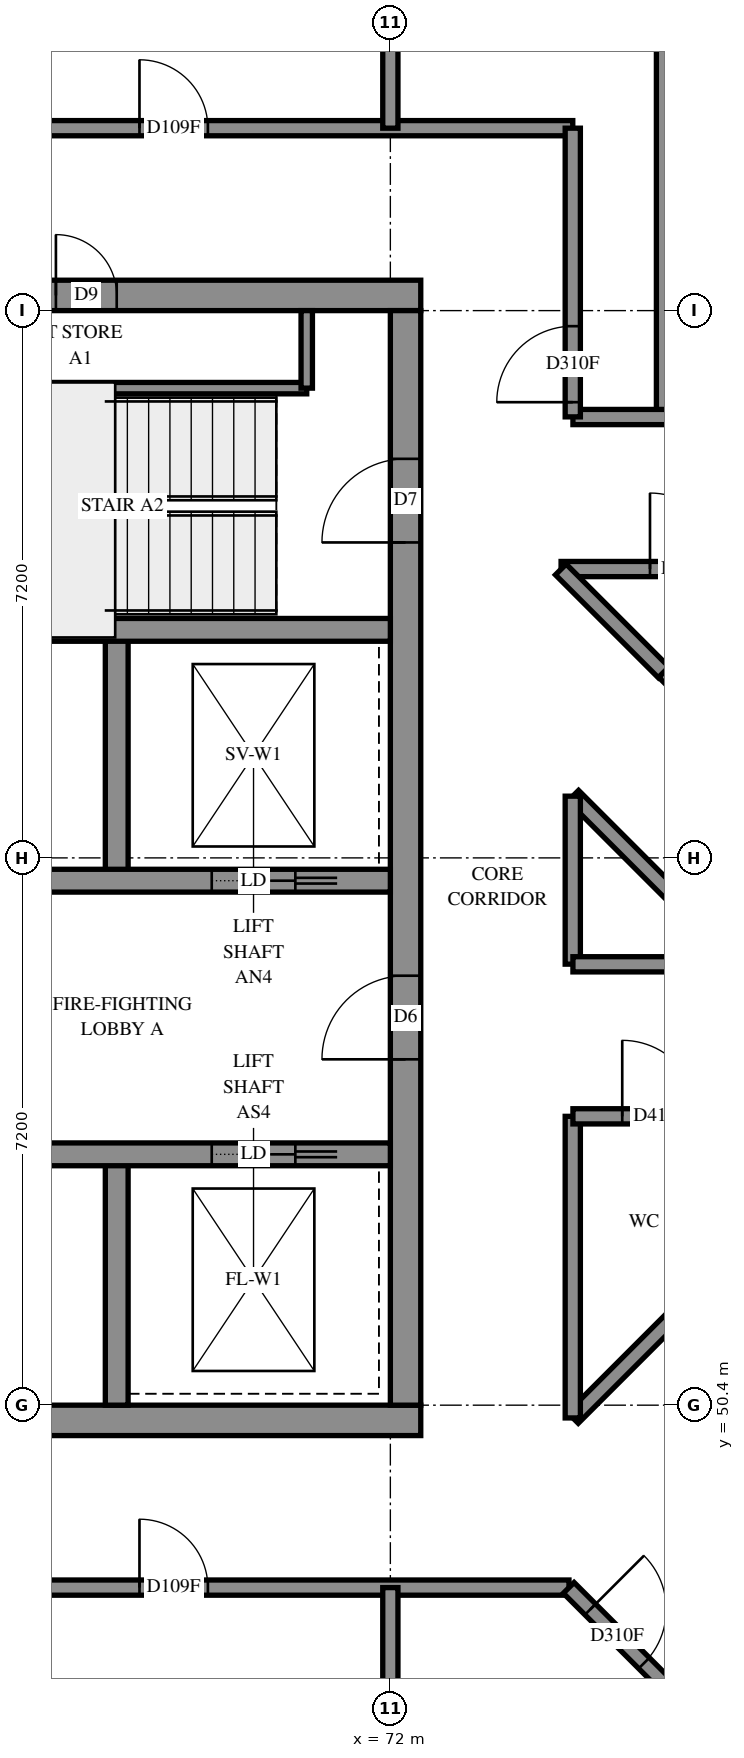
"""IFC4 building model, lengths in metres.
Left out: names, types, materials, properties, quantities, classifications, styles, units other than length and angle.
Written with IfcOpenShell. Run it as: python <this file> out.ifc"""

import sys

from ifc_helpers import new_model, si_unit, direction, frame, frame_2d, origin, place, context, subcontext, project, spatial, rectangle, extrude, element, fill, save


model = new_model("IFC4")
c1 = context("Model", 3, precision=1e-05, world=origin(), true_north=direction((0.0, 1.0)))
c2 = subcontext(c1, "Body", "Model", "MODEL_VIEW")
j1 = project(units=[si_unit("LENGTHUNIT", "METRE"), si_unit("PLANEANGLEUNIT", "RADIAN")], contexts=[c1])
p1 = place(None, origin())
s1 = spatial("IfcSite", under=j1, at=p1, CompositionType="ELEMENT")
p2 = place(p1, origin())
s2 = spatial("IfcBuilding", under=s1, at=p2, CompositionType="ELEMENT")
p3 = place(p2, frame((0.0, 0.0, 243.8)))
s3 = spatial("IfcBuildingStorey", under=s2, at=p3, CompositionType="ELEMENT", Elevation=243.8)
p4 = place(p3, frame((57.2, 50.2, -0.3), z_axis=(0.0, 0.0, 1.0), x_axis=(1.0, 0.0, 0.0)))
e1 = element("IfcWall", 1, at=p4, inside=s3, PredefinedType="SHEAR", context=c2, shape_type="SweptSolid", body=[
    extrude(rectangle(XDim=15.2, YDim=0.4, at=frame_2d((7.6, 0.0))), origin(), (0.0, 0.0, 1.0), 2.7),
])
p5 = place(p3, frame((57.2, 65.0, -0.3), z_axis=(0.0, 0.0, 1.0), x_axis=(1.0, 0.0, 0.0)))
e2 = element("IfcWall", 2, at=p5, inside=s3, PredefinedType="SHEAR", context=c2, shape_type="SweptSolid", body=[
    extrude(rectangle(XDim=15.2, YDim=0.4, at=frame_2d((7.6, 0.0))), origin(), (0.0, 0.0, 1.0), 2.7),
])
p6 = place(p5, frame((10.4, 0.0, 0.3)))
e3 = element("IfcOpeningElement", 3, at=p6, cuts=e2, PredefinedType="OPENING", context=c2, shape_type="SweptSolid", body=[
    extrude(rectangle(XDim=0.8, YDim=2.1, at=frame_2d((0.4, 1.05))), frame((0.0, 0.21, 0.0), z_axis=(0.0, -1.0, 0.0), x_axis=(1.0, 0.0, 0.0)), (0.0, 0.0, 1.0), 0.42),
])
p7 = place(p3, frame((72.2, 50.4, -0.3), z_axis=(0.0, 0.0, 1.0), x_axis=(0.0, 1.0, 0.0)))
e4 = element("IfcWall", 4, at=p7, inside=s3, PredefinedType="SHEAR", context=c2, shape_type="SweptSolid", body=[
    extrude(rectangle(XDim=14.4, YDim=0.4, at=frame_2d((7.2, 0.0))), origin(), (0.0, 0.0, 1.0), 2.7),
])
p8 = place(p7, frame((4.55, 0.0, 0.3)))
e5 = element("IfcOpeningElement", 5, at=p8, cuts=e4, PredefinedType="OPENING", context=c2, shape_type="SweptSolid", body=[
    extrude(rectangle(XDim=1.1, YDim=2.1, at=frame_2d((0.55, 1.05))), frame((0.0, 0.21, 0.0), z_axis=(0.0, -1.0, 0.0), x_axis=(1.0, 0.0, 0.0)), (0.0, 0.0, 1.0), 0.42),
])
p9 = place(p7, frame((11.35, 0.0, 0.3)))
e6 = element("IfcOpeningElement", 6, at=p9, cuts=e4, PredefinedType="OPENING", context=c2, shape_type="SweptSolid", body=[
    extrude(rectangle(XDim=1.1, YDim=2.1, at=frame_2d((0.55, 1.05))), frame((0.0, 0.21, 0.0), z_axis=(0.0, -1.0, 0.0), x_axis=(1.0, 0.0, 0.0)), (0.0, 0.0, 1.0), 0.42),
])
for number, where, z_axis, x_axis in (
    (7, (68.4, 50.4, 0.0), (0.0, 0.0, 1.0), (0.0, 1.0, 0.0)),
    (8, (68.4, 57.3, 0.0), (0.0, 0.0, 1.0), (0.0, 1.0, 0.0)),
):
    element("IfcWall", number, at=place(p3, frame(where, z_axis=z_axis, x_axis=x_axis)), inside=s3, PredefinedType="SOLIDWALL", context=c2, shape_type="SweptSolid", body=[
        extrude(rectangle(XDim=3.3, YDim=0.3, at=frame_2d((1.65, 0.0))), origin(), (0.0, 0.0, 1.0), 3.1),
    ])
p10 = place(p3, frame((57.6, 53.7, 0.0), z_axis=(0.0, 0.0, 1.0), x_axis=(1.0, 0.0, 0.0)))
e9 = element("IfcWall", 9, at=p10, inside=s3, PredefinedType="SOLIDWALL", context=c2, shape_type="SweptSolid", body=[
    extrude(rectangle(XDim=14.4, YDim=0.3, at=frame_2d((7.2, 0.0))), origin(), (0.0, 0.0, 1.0), 3.1),
])
p11 = place(p10, frame((1.35, 0.0, 0.0)))
e10 = element("IfcOpeningElement", 10, at=p11, cuts=e9, PredefinedType="OPENING", context=c2, shape_type="SweptSolid", body=[
    extrude(rectangle(XDim=0.9, YDim=2.1, at=frame_2d((0.45, 1.05))), frame((0.0, 0.16, 0.0), z_axis=(0.0, -1.0, 0.0), x_axis=(1.0, 0.0, 0.0)), (0.0, 0.0, 1.0), 0.32),
])
p12 = place(p10, frame((4.95, 0.0, 0.0)))
e11 = element("IfcOpeningElement", 11, at=p12, cuts=e9, PredefinedType="OPENING", context=c2, shape_type="SweptSolid", body=[
    extrude(rectangle(XDim=0.9, YDim=2.1, at=frame_2d((0.45, 1.05))), frame((0.0, 0.16, 0.0), z_axis=(0.0, -1.0, 0.0), x_axis=(1.0, 0.0, 0.0)), (0.0, 0.0, 1.0), 0.32),
])
p13 = place(p10, frame((8.55, 0.0, 0.0)))
e12 = element("IfcOpeningElement", 12, at=p13, cuts=e9, PredefinedType="OPENING", context=c2, shape_type="SweptSolid", body=[
    extrude(rectangle(XDim=0.9, YDim=2.1, at=frame_2d((0.45, 1.05))), frame((0.0, 0.16, 0.0), z_axis=(0.0, -1.0, 0.0), x_axis=(1.0, 0.0, 0.0)), (0.0, 0.0, 1.0), 0.32),
])
p14 = place(p10, frame((12.05, 0.0, 0.0)))
e13 = element("IfcOpeningElement", 13, at=p14, cuts=e9, PredefinedType="OPENING", context=c2, shape_type="SweptSolid", body=[
    extrude(rectangle(XDim=1.1, YDim=2.1, at=frame_2d((0.55, 1.05))), frame((0.0, 0.16, 0.0), z_axis=(0.0, -1.0, 0.0), x_axis=(1.0, 0.0, 0.0)), (0.0, 0.0, 1.0), 0.32),
])
p15 = place(p3, frame((57.6, 57.3, 0.0), z_axis=(0.0, 0.0, 1.0), x_axis=(1.0, 0.0, 0.0)))
e14 = element("IfcWall", 14, at=p15, inside=s3, PredefinedType="SOLIDWALL", context=c2, shape_type="SweptSolid", body=[
    extrude(rectangle(XDim=14.4, YDim=0.3, at=frame_2d((7.2, 0.0))), origin(), (0.0, 0.0, 1.0), 3.1),
])
p16 = place(p15, frame((8.55, 0.0, 0.0)))
e15 = element("IfcOpeningElement", 15, at=p16, cuts=e14, PredefinedType="OPENING", context=c2, shape_type="SweptSolid", body=[
    extrude(rectangle(XDim=0.9, YDim=2.1, at=frame_2d((0.45, 1.05))), frame((0.0, 0.16, 0.0), z_axis=(0.0, -1.0, 0.0), x_axis=(1.0, 0.0, 0.0)), (0.0, 0.0, 1.0), 0.32),
])
p17 = place(p15, frame((1.25, 0.0, 0.0)))
e16 = element("IfcOpeningElement", 16, at=p17, cuts=e14, PredefinedType="OPENING", context=c2, shape_type="SweptSolid", body=[
    extrude(rectangle(XDim=1.1, YDim=2.1, at=frame_2d((0.55, 1.05))), frame((0.0, 0.16, 0.0), z_axis=(0.0, -1.0, 0.0), x_axis=(1.0, 0.0, 0.0)), (0.0, 0.0, 1.0), 0.32),
])
p18 = place(p15, frame((4.85, 0.0, 0.0)))
e17 = element("IfcOpeningElement", 17, at=p18, cuts=e14, PredefinedType="OPENING", context=c2, shape_type="SweptSolid", body=[
    extrude(rectangle(XDim=1.1, YDim=2.1, at=frame_2d((0.55, 1.05))), frame((0.0, 0.16, 0.0), z_axis=(0.0, -1.0, 0.0), x_axis=(1.0, 0.0, 0.0)), (0.0, 0.0, 1.0), 0.32),
])
p19 = place(p15, frame((12.05, 0.0, 0.0)))
e18 = element("IfcOpeningElement", 18, at=p19, cuts=e14, PredefinedType="OPENING", context=c2, shape_type="SweptSolid", body=[
    extrude(rectangle(XDim=1.1, YDim=2.1, at=frame_2d((0.55, 1.05))), frame((0.0, 0.16, 0.0), z_axis=(0.0, -1.0, 0.0), x_axis=(1.0, 0.0, 0.0)), (0.0, 0.0, 1.0), 0.32),
])
p20 = place(p3, frame((64.8, 60.6, 0.0), z_axis=(0.0, 0.0, 1.0), x_axis=(1.0, 0.0, 0.0)))
e19 = element("IfcWall", 19, at=p20, inside=s3, PredefinedType="SOLIDWALL", context=c2, shape_type="SweptSolid", body=[
    extrude(rectangle(XDim=7.2, YDim=0.3, at=frame_2d((3.6, 0.0))), origin(), (0.0, 0.0, 1.0), 3.1),
])
p21 = place(p3, frame((64.95, 63.78, 0.0), z_axis=(0.0, 0.0, 1.0), x_axis=(1.0, 0.0, 0.0)))
e20 = element("IfcWall", 20, at=p21, inside=s3, PredefinedType="PARTITIONING", context=c2, shape_type="SweptSolid", body=[
    extrude(rectangle(XDim=5.95, YDim=0.15, at=frame_2d((2.975, 0.0))), origin(), (0.0, 0.0, 1.0), 3.1),
])
p22 = place(p3, frame((70.9, 63.78, 0.0), z_axis=(0.0, 0.0, 1.0), x_axis=(0.0, 1.0, 0.0)))
e21 = element("IfcWall", 21, at=p22, inside=s3, PredefinedType="PARTITIONING", context=c2, shape_type="SweptSolid", body=[
    extrude(rectangle(XDim=1.02, YDim=0.15, at=frame_2d((0.51, 0.0))), origin(), (0.0, 0.0, 1.0), 3.1),
])
p23 = place(p3, frame((55.2, 67.2, 0.0), z_axis=(0.0, 0.0, 1.0), x_axis=(1.0, 0.0, 0.0)))
e22 = element("IfcWall", 22, at=p23, inside=s3, PredefinedType="PARTITIONING", context=c2, shape_type="SweptSolid", body=[
    extrude(rectangle(XDim=19.2, YDim=0.2, at=frame_2d((9.6, 0.0))), origin(), (0.0, 0.0, 1.0), 3.1),
])
p24 = place(p23, frame((6.149, 0.0, 0.0)))
e23 = element("IfcOpeningElement", 23, at=p24, cuts=e22, PredefinedType="OPENING", context=c2, shape_type="SweptSolid", body=[
    extrude(rectangle(XDim=0.9, YDim=2.1, at=frame_2d((0.45, 1.05))), frame((0.0, 0.11, 0.0), z_axis=(0.0, -1.0, 0.0), x_axis=(1.0, 0.0, 0.0)), (0.0, 0.0, 1.0), 0.22),
])
p25 = place(p23, frame((13.499, 0.0, 0.0)))
e24 = element("IfcOpeningElement", 24, at=p25, cuts=e22, PredefinedType="OPENING", context=c2, shape_type="SweptSolid", body=[
    extrude(rectangle(XDim=0.9, YDim=2.1, at=frame_2d((0.45, 1.05))), frame((0.0, 0.11, 0.0), z_axis=(0.0, -1.0, 0.0), x_axis=(1.0, 0.0, 0.0)), (0.0, 0.0, 1.0), 0.22),
])
p26 = place(p3, frame((55.2, 48.0, 0.0), z_axis=(0.0, 0.0, 1.0), x_axis=(1.0, 0.0, 0.0)))
e25 = element("IfcWall", 25, at=p26, inside=s3, PredefinedType="PARTITIONING", context=c2, shape_type="SweptSolid", body=[
    extrude(rectangle(XDim=19.15, YDim=0.2, at=frame_2d((9.575, 0.0))), origin(), (0.0, 0.0, 1.0), 3.1),
])
p27 = place(p26, frame((6.299, 0.0, 0.0)))
e26 = element("IfcOpeningElement", 26, at=p27, cuts=e25, PredefinedType="OPENING", context=c2, shape_type="SweptSolid", body=[
    extrude(rectangle(XDim=0.9, YDim=2.1, at=frame_2d((0.45, 1.05))), frame((0.0, 0.11, 0.0), z_axis=(0.0, -1.0, 0.0), x_axis=(1.0, 0.0, 0.0)), (0.0, 0.0, 1.0), 0.22),
])
p28 = place(p26, frame((13.499, 0.0, 0.0)))
e27 = element("IfcOpeningElement", 27, at=p28, cuts=e25, PredefinedType="OPENING", context=c2, shape_type="SweptSolid", body=[
    extrude(rectangle(XDim=0.9, YDim=2.1, at=frame_2d((0.45, 1.05))), frame((0.0, 0.11, 0.0), z_axis=(0.0, -1.0, 0.0), x_axis=(1.0, 0.0, 0.0)), (0.0, 0.0, 1.0), 0.22),
])
p29 = place(p3, frame((75.6, 63.4, 0.0), z_axis=(0.0, 0.0, 1.0), x_axis=(0.0, 1.0, 0.0)))
e28 = element("IfcWall", 28, at=p29, inside=s3, PredefinedType="PARTITIONING", context=c2, shape_type="SweptSolid", body=[
    extrude(rectangle(XDim=9.4, YDim=0.2, at=frame_2d((4.7, 0.0))), origin(), (0.0, 0.0, 1.0), 3.1),
])
p30 = place(p3, frame((74.401, 50.233, 0.0), z_axis=(0.0, 0.0, 1.0), x_axis=(0.7071067812, 0.7071067812, 0.0)))
e29 = element("IfcWall", 29, at=p30, inside=s3, PredefinedType="PARTITIONING", context=c2, shape_type="SweptSolid", body=[
    extrude(rectangle(XDim=5.609, YDim=0.2, at=frame_2d((2.804, 0.0))), origin(), (0.0, 0.0, 1.0), 3.1),
])
p31 = place(p3, frame((74.246, 61.4, 0.0), z_axis=(0.0, 0.0, 1.0), x_axis=(1.0, 0.0, 0.0)))
e30 = element("IfcWall", 30, at=p31, inside=s3, PredefinedType="PARTITIONING", context=c2, shape_type="SweptSolid", body=[
    extrude(rectangle(XDim=4.954, YDim=0.2, at=frame_2d((2.477, 0.0))), origin(), (0.0, 0.0, 1.0), 3.1),
])
p32 = place(p31, frame((1.17, 0.0, 0.0)))
e31 = element("IfcOpeningElement", 31, at=p32, cuts=e30, PredefinedType="OPENING", context=c2, shape_type="SweptSolid", body=[
    extrude(rectangle(XDim=1.0, YDim=2.1, at=frame_2d((0.5, 1.05))), frame((0.0, 0.11, 0.0), z_axis=(0.0, -1.0, 0.0), x_axis=(1.0, 0.0, 0.0)), (0.0, 0.0, 1.0), 0.22),
])
p33 = place(p3, frame((74.402, 63.4, 0.0), z_axis=(0.0, 0.0, 1.0), x_axis=(1.0, 0.0, 0.0)))
e32 = element("IfcWall", 32, at=p33, inside=s3, PredefinedType="PARTITIONING", context=c2, shape_type="SweptSolid", body=[
    extrude(rectangle(XDim=4.798, YDim=0.2, at=frame_2d((2.399, 0.0))), origin(), (0.0, 0.0, 1.0), 3.1),
])
p34 = place(p33, frame((1.723, 0.0, 0.0)))
e33 = element("IfcOpeningElement", 33, at=p34, cuts=e32, PredefinedType="OPENING", context=c2, shape_type="SweptSolid", body=[
    extrude(rectangle(XDim=1.0, YDim=2.1, at=frame_2d((0.5, 1.05))), frame((0.0, 0.11, 0.0), z_axis=(0.0, -1.0, 0.0), x_axis=(1.0, 0.0, 0.0)), (0.0, 0.0, 1.0), 0.22),
])
p35 = place(p3, frame((74.347, 47.997, 0.0), z_axis=(0.0, 0.0, 1.0), x_axis=(0.7071067812, -0.7071067812, 0.0)))
e34 = element("IfcWall", 34, at=p35, inside=s3, PredefinedType="PARTITIONING", context=c2, shape_type="SweptSolid", body=[
    extrude(rectangle(XDim=4.596, YDim=0.2, at=frame_2d((2.298, 0.0))), origin(), (0.0, 0.0, 1.0), 3.1),
])
p36 = place(p35, frame((0.401, 0.0, 0.0)))
e35 = element("IfcOpeningElement", 35, at=p36, cuts=e34, PredefinedType="OPENING", context=c2, shape_type="SweptSolid", body=[
    extrude(rectangle(XDim=1.0, YDim=2.1, at=frame_2d((0.5, 1.05))), frame((0.0, 0.11, 0.0), z_axis=(0.0, -1.0, 0.0), x_axis=(1.0, 0.0, 0.0)), (0.0, 0.0, 1.0), 0.22),
])
for number, where, z_axis, x_axis in (
    (36, (72.0, 43.55, 0.0), (0.0, 0.0, 1.0), (0.0, 1.0, 0.0)),
    (37, (72.0, 67.2, 0.0), (0.0, 0.0, 1.0), (0.0, 1.0, 0.0)),
):
    element("IfcWall", number, at=place(p3, frame(where, z_axis=z_axis, x_axis=x_axis)), inside=s3, PredefinedType="PARTITIONING", context=c2, shape_type="SweptSolid", body=[
        extrude(rectangle(XDim=4.45, YDim=0.2, at=frame_2d((2.225, 0.0))), origin(), (0.0, 0.0, 1.0), 3.1),
    ])
p37 = place(p3, frame((74.4, 50.232, 0.0), z_axis=(0.0, 0.0, 1.0), x_axis=(0.0, 1.0, 0.0)))
e38 = element("IfcWall", 38, at=p37, inside=s3, PredefinedType="PARTITIONING", context=c2, shape_type="SweptSolid", body=[
    extrude(rectangle(XDim=3.968, YDim=0.2, at=frame_2d((1.984, 0.0))), origin(), (0.0, 0.0, 1.0), 3.1),
])
p38 = place(p3, frame((74.402, 54.2, 0.0), z_axis=(0.0, 0.0, 1.0), x_axis=(1.0, 0.0, 0.0)))
e39 = element("IfcWall", 39, at=p38, inside=s3, PredefinedType="PARTITIONING", context=c2, shape_type="SweptSolid", body=[
    extrude(rectangle(XDim=3.966, YDim=0.2, at=frame_2d((1.983, 0.0))), origin(), (0.0, 0.0, 1.0), 3.1),
])
p39 = place(p38, frame((0.649, 0.0, 0.0)))
e40 = element("IfcOpeningElement", 40, at=p39, cuts=e39, PredefinedType="OPENING", context=c2, shape_type="SweptSolid", body=[
    extrude(rectangle(XDim=1.0, YDim=2.1, at=frame_2d((0.5, 1.05))), frame((0.0, 0.11, 0.0), z_axis=(0.0, -1.0, 0.0), x_axis=(1.0, 0.0, 0.0)), (0.0, 0.0, 1.0), 0.22),
])
p40 = place(p3, frame((74.4, 63.402, 0.0), z_axis=(0.0, 0.0, 1.0), x_axis=(0.0, 1.0, 0.0)))
e41 = element("IfcWall", 41, at=p40, inside=s3, PredefinedType="PARTITIONING", context=c2, shape_type="SweptSolid", body=[
    extrude(rectangle(XDim=3.798, YDim=0.2, at=frame_2d((1.899, 0.0))), origin(), (0.0, 0.0, 1.0), 3.1),
])
p41 = place(p40, frame((0.193, 0.0, 0.0)))
e42 = element("IfcOpeningElement", 42, at=p41, cuts=e41, PredefinedType="OPENING", context=c2, shape_type="SweptSolid", body=[
    extrude(rectangle(XDim=1.0, YDim=2.1, at=frame_2d((0.5, 1.05))), frame((0.0, 0.11, 0.0), z_axis=(0.0, -1.0, 0.0), x_axis=(1.0, 0.0, 0.0)), (0.0, 0.0, 1.0), 0.22),
])
p42 = place(p3, frame((74.406, 58.417, 0.0), z_axis=(0.0, 0.0, 1.0), x_axis=(0.7071067812, -0.7071067812, 0.0)))
e43 = element("IfcWall", 43, at=p42, inside=s3, PredefinedType="PARTITIONING", context=c2, shape_type="SweptSolid", body=[
    extrude(rectangle(XDim=3.128, YDim=0.2, at=frame_2d((1.564, 0.0))), origin(), (0.0, 0.0, 1.0), 3.1),
])
for number, where, z_axis, x_axis in (
    (44, (74.4, 56.202, 0.0), (0.0, 0.0, 1.0), (0.0, 1.0, 0.0)),
    (45, (74.402, 56.2, 0.0), (0.0, 0.0, 1.0), (1.0, 0.0, 0.0)),
):
    element("IfcWall", number, at=place(p3, frame(where, z_axis=z_axis, x_axis=x_axis)), inside=s3, PredefinedType="PARTITIONING", context=c2, shape_type="SweptSolid", body=[
        extrude(rectangle(XDim=2.21, YDim=0.2, at=frame_2d((1.105, 0.0))), origin(), (0.0, 0.0, 1.0), 3.1),
    ])
p43 = place(p3, frame((74.243, 61.395, 0.0), z_axis=(0.0, 0.0, 1.0), x_axis=(0.7071067812, -0.7071067812, 0.0)))
e46 = element("IfcWall", 46, at=p43, inside=s3, PredefinedType="PARTITIONING", context=c2, shape_type="SweptSolid", body=[
    extrude(rectangle(XDim=1.915, YDim=0.2, at=frame_2d((0.957, 0.0))), origin(), (0.0, 0.0, 1.0), 3.1),
])
p44 = place(p3, frame((75.602, 60.046, 0.0), z_axis=(0.0, 0.0, 1.0), x_axis=(0.7063318703, -0.7078808437, 0.0)))
e47 = element("IfcWall", 47, at=p44, inside=s3, PredefinedType="PARTITIONING", context=c2, shape_type="SweptSolid", body=[
    extrude(rectangle(XDim=1.291, YDim=0.2, at=frame_2d((0.646, 0.0))), origin(), (0.0, 0.0, 1.0), 3.1),
])
p45 = place(p6, origin())
e48 = element("IfcDoor", 48, at=p45, inside=s3, OperationType="SINGLE_SWING_RIGHT", PredefinedType="DOOR", context=c2, shape_type="SweptSolid", body=[
    extrude(rectangle(XDim=0.8, YDim=2.1, at=frame_2d((0.4, 1.05))), frame((0.0, 0.025, 0.0), z_axis=(0.0, -1.0, 0.0), x_axis=(1.0, 0.0, 0.0)), (0.0, 0.0, 1.0), 0.05),
])
fill(e3, e48)
p46 = place(p8, origin())
e49 = element("IfcDoor", 49, at=p46, inside=s3, OperationType="DOUBLE_DOOR_SINGLE_SWING", PredefinedType="DOOR", context=c2, shape_type="SweptSolid", body=[
    extrude(rectangle(XDim=1.1, YDim=2.1, at=frame_2d((0.55, 1.05))), frame((0.0, 0.025, 0.0), z_axis=(0.0, -1.0, 0.0), x_axis=(1.0, 0.0, 0.0)), (0.0, 0.0, 1.0), 0.05),
])
fill(e5, e49)
p47 = place(p9, origin())
e50 = element("IfcDoor", 50, at=p47, inside=s3, OperationType="SINGLE_SWING_RIGHT", PredefinedType="DOOR", context=c2, shape_type="SweptSolid", body=[
    extrude(rectangle(XDim=1.1, YDim=2.1, at=frame_2d((0.55, 1.05))), frame((0.0, 0.025, 0.0), z_axis=(0.0, -1.0, 0.0), x_axis=(1.0, 0.0, 0.0)), (0.0, 0.0, 1.0), 0.05),
])
fill(e6, e50)
p48 = place(p14, origin())
e51 = element("IfcDoor", 51, at=p48, inside=s3, OperationType="SLIDING_TO_RIGHT", PredefinedType="DOOR", context=c2, shape_type="SweptSolid", body=[
    extrude(rectangle(XDim=1.1, YDim=2.1, at=frame_2d((0.55, 1.05))), frame((0.0, 0.025, 0.0), z_axis=(0.0, -1.0, 0.0), x_axis=(1.0, 0.0, 0.0)), (0.0, 0.0, 1.0), 0.05),
])
fill(e13, e51)
p49 = place(p19, origin())
e52 = element("IfcDoor", 52, at=p49, inside=s3, OperationType="SLIDING_TO_RIGHT", PredefinedType="DOOR", context=c2, shape_type="SweptSolid", body=[
    extrude(rectangle(XDim=1.1, YDim=2.1, at=frame_2d((0.55, 1.05))), frame((0.0, 0.025, 0.0), z_axis=(0.0, -1.0, 0.0), x_axis=(1.0, 0.0, 0.0)), (0.0, 0.0, 1.0), 0.05),
])
fill(e18, e52)
p50 = place(p39, origin())
e53 = element("IfcDoor", 53, at=p50, inside=s3, OperationType="SINGLE_SWING_RIGHT", PredefinedType="DOOR", context=c2, shape_type="SweptSolid", body=[
    extrude(rectangle(XDim=1.0, YDim=2.1, at=frame_2d((0.5, 1.05))), frame((0.0, 0.025, 0.0), z_axis=(0.0, -1.0, 0.0), x_axis=(1.0, 0.0, 0.0)), (0.0, 0.0, 1.0), 0.05),
])
fill(e40, e53)
p51 = place(p41, origin())
e54 = element("IfcDoor", 54, at=p51, inside=s3, OperationType="SINGLE_SWING_RIGHT", PredefinedType="DOOR", context=c2, shape_type="SweptSolid", body=[
    extrude(rectangle(XDim=1.0, YDim=2.1, at=frame_2d((0.5, 1.05))), frame((0.0, 0.025, 0.0), z_axis=(0.0, -1.0, 0.0), x_axis=(1.0, 0.0, 0.0)), (0.0, 0.0, 1.0), 0.05),
])
fill(e42, e54)
p52 = place(p25, origin())
e55 = element("IfcDoor", 55, at=p52, inside=s3, OperationType="SINGLE_SWING_RIGHT", PredefinedType="DOOR", context=c2, shape_type="SweptSolid", body=[
    extrude(rectangle(XDim=0.9, YDim=2.1, at=frame_2d((0.45, 1.05))), frame((0.0, 0.025, 0.0), z_axis=(0.0, -1.0, 0.0), x_axis=(1.0, 0.0, 0.0)), (0.0, 0.0, 1.0), 0.05),
])
fill(e24, e55)
p53 = place(p28, origin())
e56 = element("IfcDoor", 56, at=p53, inside=s3, OperationType="SINGLE_SWING_LEFT", PredefinedType="DOOR", context=c2, shape_type="SweptSolid", body=[
    extrude(rectangle(XDim=0.9, YDim=2.1, at=frame_2d((0.45, 1.05))), frame((0.0, 0.025, 0.0), z_axis=(0.0, -1.0, 0.0), x_axis=(1.0, 0.0, 0.0)), (0.0, 0.0, 1.0), 0.05),
])
fill(e27, e56)
p54 = place(p36, origin())
e57 = element("IfcDoor", 57, at=p54, inside=s3, OperationType="SINGLE_SWING_LEFT", PredefinedType="DOOR", context=c2, shape_type="SweptSolid", body=[
    extrude(rectangle(XDim=1.0, YDim=2.1, at=frame_2d((0.5, 1.05))), frame((0.0, 0.025, 0.0), z_axis=(0.0, -1.0, 0.0), x_axis=(1.0, 0.0, 0.0)), (0.0, 0.0, 1.0), 0.05),
])
fill(e35, e57)
p55 = place(p32, origin())
e58 = element("IfcDoor", 58, at=p55, inside=s3, OperationType="SINGLE_SWING_RIGHT", PredefinedType="DOOR", context=c2, shape_type="SweptSolid", body=[
    extrude(rectangle(XDim=1.0, YDim=2.1, at=frame_2d((0.5, 1.05))), frame((0.0, 0.025, 0.0), z_axis=(0.0, -1.0, 0.0), x_axis=(1.0, 0.0, 0.0)), (0.0, 0.0, 1.0), 0.05),
])
fill(e31, e58)
save(model, sys.argv[1])
